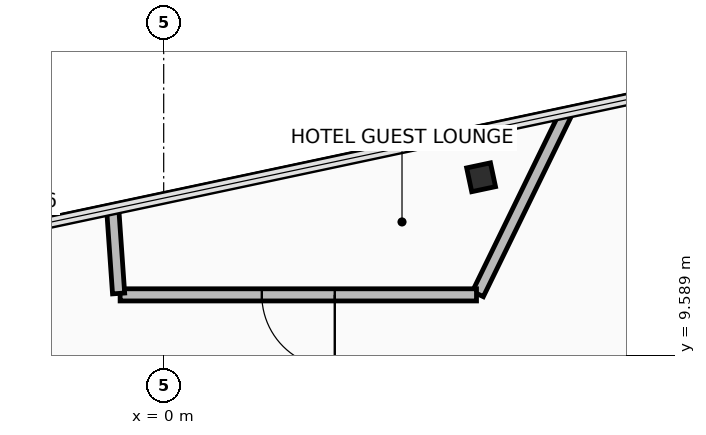
"""IFC4 building model, lengths in metres.
Left out: names, types, materials, properties, quantities, classifications, styles, units other than length and angle.
Written with IfcOpenShell. Run it as: python <this file> out.ifc"""

import sys

from ifc_helpers import new_model, si_unit, direction, frame, frame_2d, origin, origin_2d, place, context, subcontext, project, spatial, rectangle, hollow_rectangle, extrude, element, fill, save


model = new_model("IFC4")
c1 = context("Model", 3, precision=1e-05, world=origin(), true_north=direction((0.0, 1.0)))
c2 = subcontext(c1, "Body", "Model", "MODEL_VIEW")
j1 = project(units=[si_unit("LENGTHUNIT", "METRE"), si_unit("PLANEANGLEUNIT", "RADIAN")], contexts=[c1])
p1 = place(None, origin())
s1 = spatial("IfcSite", under=j1, at=p1, CompositionType="ELEMENT")
p2 = place(p1, origin())
s2 = spatial("IfcBuilding", under=s1, at=p2, CompositionType="ELEMENT")
p3 = place(p2, frame((0.0, 0.0, 279.75)))
s3 = spatial("IfcBuildingStorey", under=s2, at=p3, CompositionType="ELEMENT", Elevation=279.75)
p4 = place(p3, frame((5.22, 12.514, -0.19), z_axis=(0.0, 0.0, 1.0), x_axis=(0.978147237858, 0.207913398007, 0.0)))
e1 = element("IfcColumn", 1, at=p4, inside=s3, PredefinedType="COLUMN", context=c2, shape_type="SweptSolid", body=[
    extrude(hollow_rectangle(XDim=0.4, YDim=0.4, WallThickness=0.025, at=origin_2d()), origin(), (0.0, 0.0, 1.0), 3.84),
])
p5 = place(p3, frame((6.623, 13.579, 0.0), z_axis=(0.0, 0.0, 1.0), x_axis=(-0.438399007469, -0.898780457203, 0.0)))
e2 = element("IfcWall", 2, at=p5, inside=s3, PredefinedType="PARTITIONING", context=c2, shape_type="SweptSolid", body=[
    extrude(rectangle(XDim=3.321, YDim=0.2, at=frame_2d((1.66, 0.0))), origin(), (0.0, 0.0, 1.0), 2.81),
])
p6 = place(p3, frame((5.145, 10.58, 0.0), z_axis=(0.0, 0.0, 1.0), x_axis=(-1.0, 0.0, 0.0)))
e3 = element("IfcWall", 3, at=p6, inside=s3, PredefinedType="PARTITIONING", context=c2, shape_type="SweptSolid", body=[
    extrude(rectangle(XDim=5.861, YDim=0.2, at=frame_2d((2.931, 0.0))), origin(), (0.0, 0.0, 1.0), 2.96),
])
p7 = place(p6, frame((2.331, 0.0, 0.0)))
e4 = element("IfcOpeningElement", 4, at=p7, cuts=e3, PredefinedType="OPENING", context=c2, shape_type="SweptSolid", body=[
    extrude(rectangle(XDim=1.2, YDim=2.15, at=frame_2d((0.6, 1.075))), frame((0.0, 0.11, 0.0), z_axis=(0.0, -1.0, 0.0), x_axis=(1.0, 0.0, 0.0)), (0.0, 0.0, 1.0), 0.22),
])
p8 = place(p3, frame((-0.741, 10.603, 0.0), z_axis=(0.0, 0.0, 1.0), x_axis=(-0.069804319126, 0.997560703432, 0.0)))
e5 = element("IfcWall", 5, at=p8, inside=s3, PredefinedType="PARTITIONING", context=c2, shape_type="SweptSolid", body=[
    extrude(rectangle(XDim=1.371, YDim=0.2, at=frame_2d((0.686, 0.0))), origin(), (0.0, 0.0, 1.0), 2.81),
])
p9 = place(p7, origin())
e6 = element("IfcDoor", 6, at=p9, inside=s3, OperationType="SINGLE_SWING_LEFT", PredefinedType="DOOR", context=c2, shape_type="SweptSolid", body=[
    extrude(rectangle(XDim=1.2, YDim=2.15, at=frame_2d((0.6, 1.075))), frame((0.0, 0.025, 0.0), z_axis=(0.0, -1.0, 0.0), x_axis=(1.0, 0.0, 0.0)), (0.0, 0.0, 1.0), 0.05),
])
fill(e4, e6)
save(model, sys.argv[1])
